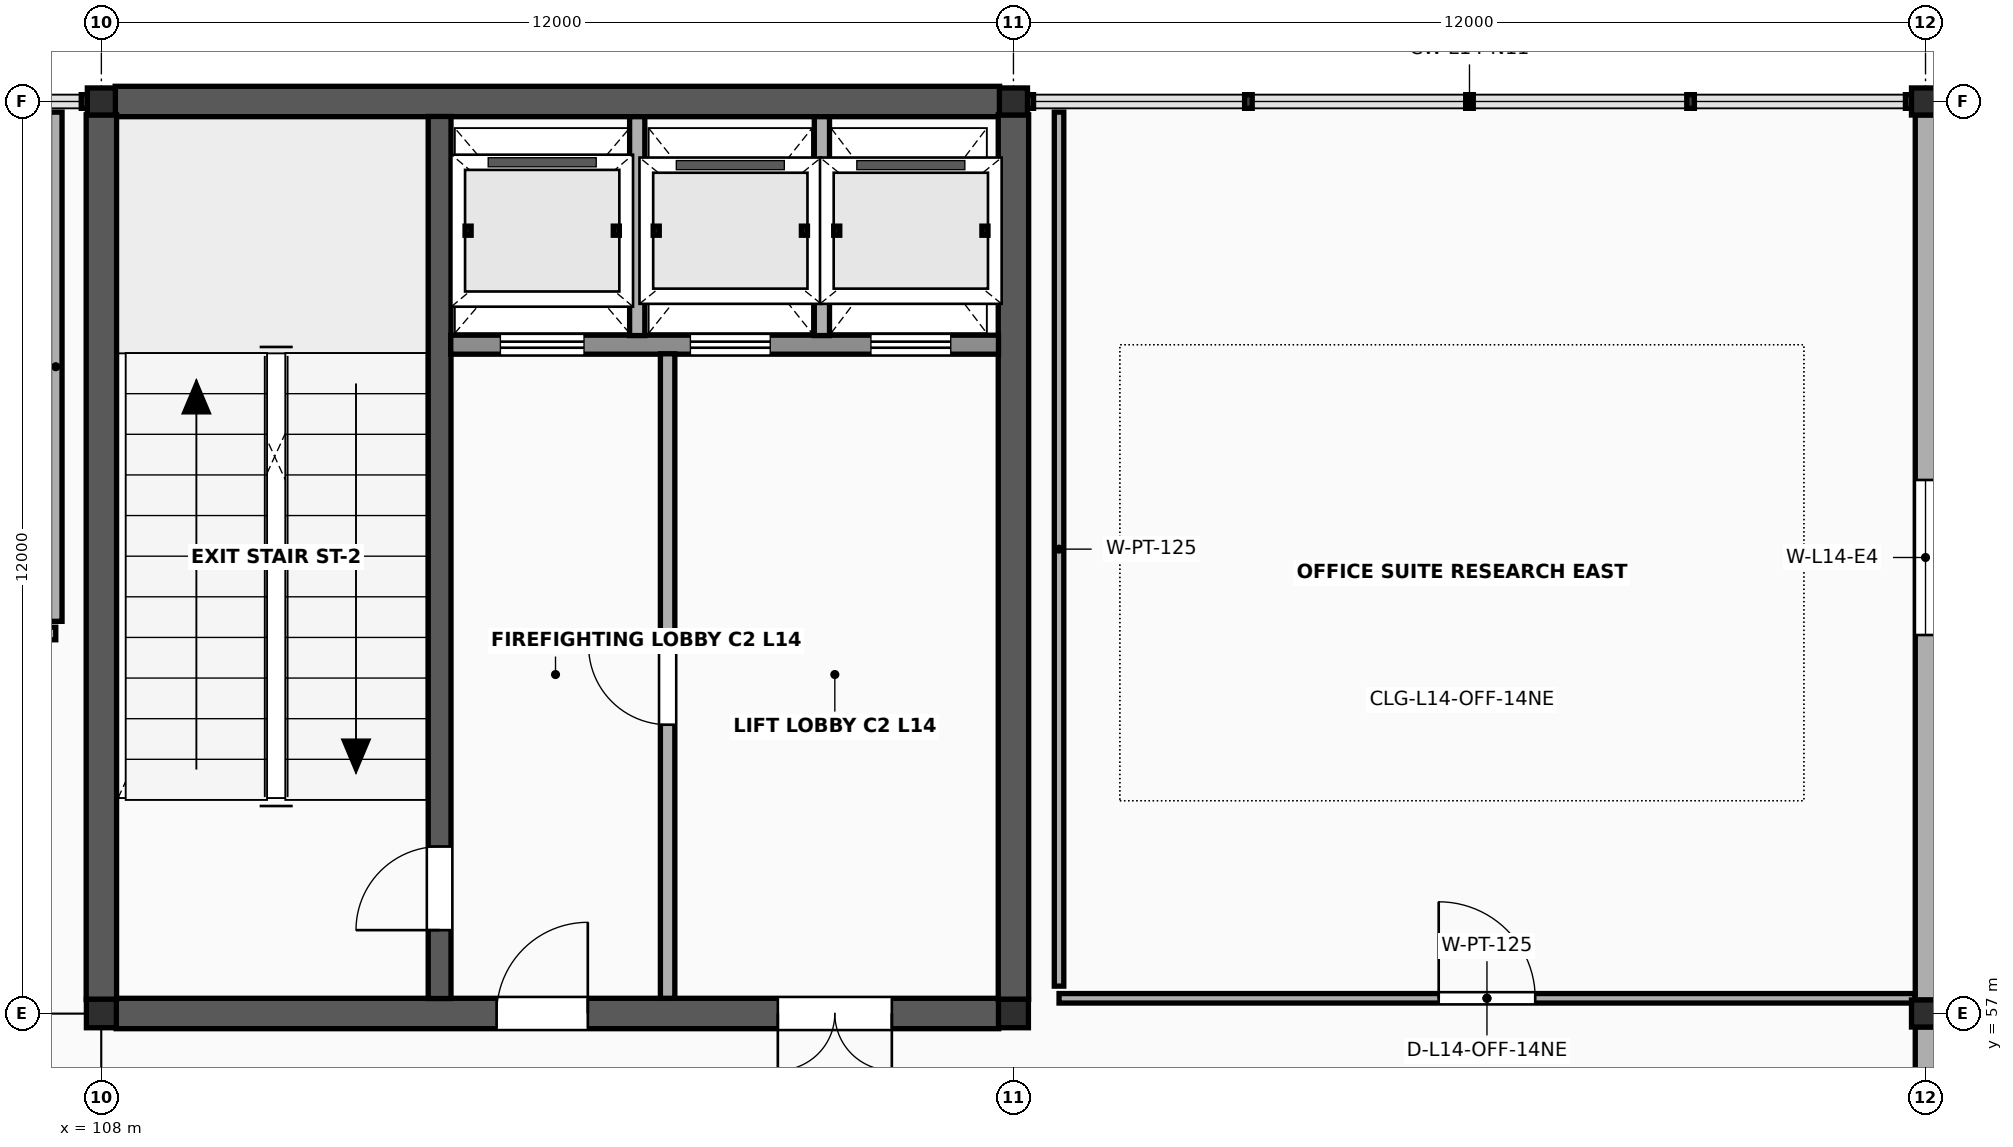
"""IFC4 building model, lengths in metres.
Left out: names, types, materials, properties, quantities, classifications, styles, units other than length and angle.
Written with IfcOpenShell. Run it as: python <this file> out.ifc"""

import sys

from ifc_helpers import new_model, si_unit, direction, frame, frame_2d, origin, origin_2d, place, context, subcontext, project, spatial, rectangle, i_section, extrude, element, fill, save


model = new_model("IFC4")
c1 = context("Model", 3, precision=1e-05, world=origin(), true_north=direction((0.0, 1.0)))
c2 = subcontext(c1, "Body", "Model", "MODEL_VIEW")
j1 = project(units=[si_unit("LENGTHUNIT", "METRE"), si_unit("PLANEANGLEUNIT", "RADIAN")], contexts=[c1])
p1 = place(None, origin())
s1 = spatial("IfcSite", under=j1, at=p1, CompositionType="ELEMENT")
p2 = place(p1, origin())
s2 = spatial("IfcBuilding", under=s1, at=p2, CompositionType="ELEMENT")
p3 = place(p2, frame((0.0, 0.0, 57.6)))
s3 = spatial("IfcBuildingStorey", under=s2, at=p3, CompositionType="ELEMENT", Elevation=57.6)
p4 = place(p3, frame((108.0, 57.0, 0.0), z_axis=(0.0, 0.0, 1.0), x_axis=(1.0, 0.0, 0.0)))
e1 = element("IfcColumn", 1, at=p4, inside=s3, PredefinedType="COLUMN", context=c2, shape_type="SweptSolid", body=[
    extrude(i_section(OverallWidth=0.394, OverallDepth=0.375, WebThickness=0.017, FlangeThickness=0.028, FilletRadius=0.018, at=origin_2d()), origin(), (0.0, 0.0, 1.0), 4.0),
])
p5 = place(p3, frame((108.0, 69.0, 0.0), z_axis=(0.0, 0.0, 1.0), x_axis=(1.0, 0.0, 0.0)))
e2 = element("IfcColumn", 2, at=p5, inside=s3, PredefinedType="COLUMN", context=c2, shape_type="SweptSolid", body=[
    extrude(i_section(OverallWidth=0.369, OverallDepth=0.356, WebThickness=0.011, FlangeThickness=0.018, FilletRadius=0.018, at=origin_2d()), origin(), (0.0, 0.0, 1.0), 4.0),
])
p6 = place(p3, frame((120.0, 57.0, 0.0), z_axis=(0.0, 0.0, 1.0), x_axis=(1.0, 0.0, 0.0)))
e3 = element("IfcColumn", 3, at=p6, inside=s3, PredefinedType="COLUMN", context=c2, shape_type="SweptSolid", body=[
    extrude(i_section(OverallWidth=0.394, OverallDepth=0.375, WebThickness=0.017, FlangeThickness=0.028, FilletRadius=0.018, at=origin_2d()), origin(), (0.0, 0.0, 1.0), 4.0),
])
for number, where, z_axis, x_axis in (
    (4, (120.0, 69.0, 0.0), (0.0, 0.0, 1.0), (1.0, 0.0, 0.0)),
    (5, (132.0, 57.0, 0.0), (0.0, 0.0, 1.0), (1.0, 0.0, 0.0)),
    (6, (132.0, 69.0, 0.0), (0.0, 0.0, 1.0), (1.0, 0.0, 0.0)),
):
    element("IfcColumn", number, at=place(p3, frame(where, z_axis=z_axis, x_axis=x_axis)), inside=s3, PredefinedType="COLUMN", context=c2, shape_type="SweptSolid", body=[
        extrude(i_section(OverallWidth=0.369, OverallDepth=0.356, WebThickness=0.011, FlangeThickness=0.018, FilletRadius=0.018, at=origin_2d()), origin(), (0.0, 0.0, 1.0), 4.0),
    ])
p7 = place(p3, frame((108.194, 57.0, 0.0), z_axis=(0.0, 0.0, 1.0), x_axis=(1.0, 0.0, 0.0)))
e7 = element("IfcWall", 7, at=p7, inside=s3, PredefinedType="SHEAR", context=c2, shape_type="SweptSolid", body=[
    extrude(rectangle(XDim=11.612, YDim=0.4, at=frame_2d((5.806, 0.0))), origin(), (0.0, 0.0, 1.0), 3.853),
])
p8 = place(p7, frame((5.006, 0.0, 0.0)))
e8 = element("IfcOpeningElement", 8, at=p8, cuts=e7, PredefinedType="OPENING", context=c2, shape_type="SweptSolid", body=[
    extrude(rectangle(XDim=1.2, YDim=2.2, at=frame_2d((0.6, 1.1))), frame((0.0, 0.215, 0.0), z_axis=(0.0, -1.0, 0.0), x_axis=(1.0, 0.0, 0.0)), (0.0, 0.0, 1.0), 0.43),
])
p9 = place(p7, frame((8.706, 0.0, 0.0)))
e9 = element("IfcOpeningElement", 9, at=p9, cuts=e7, PredefinedType="OPENING", context=c2, shape_type="SweptSolid", body=[
    extrude(rectangle(XDim=1.5, YDim=2.25, at=frame_2d((0.75, 1.125))), frame((0.0, 0.215, 0.0), z_axis=(0.0, -1.0, 0.0), x_axis=(1.0, 0.0, 0.0)), (0.0, 0.0, 1.0), 0.43),
])
p10 = place(p3, frame((108.181, 69.0, 0.0), z_axis=(0.0, 0.0, 1.0), x_axis=(1.0, 0.0, 0.0)))
e10 = element("IfcWall", 10, at=p10, inside=s3, PredefinedType="SHEAR", context=c2, shape_type="SweptSolid", body=[
    extrude(rectangle(XDim=11.637, YDim=0.4, at=frame_2d((5.819, 0.0))), origin(), (0.0, 0.0, 1.0), 3.853),
])
for number, where, z_axis, x_axis in (
    (11, (108.0, 57.185, 0.0), (0.0, 0.0, 1.0), (0.0, 1.0, 0.0)),
    (12, (120.0, 57.185, 0.0), (0.0, 0.0, 1.0), (0.0, 1.0, 0.0)),
):
    element("IfcWall", number, at=place(p3, frame(where, z_axis=z_axis, x_axis=x_axis)), inside=s3, PredefinedType="SHEAR", context=c2, shape_type="SweptSolid", body=[
        extrude(rectangle(XDim=11.64, YDim=0.4, at=frame_2d((5.82, 0.0))), origin(), (0.0, 0.0, 1.0), 3.853),
    ])
p11 = place(p3, frame((112.45, 57.197, 0.0), z_axis=(0.0, 0.0, 1.0), x_axis=(0.0, 1.0, 0.0)))
e13 = element("IfcWall", 13, at=p11, inside=s3, PredefinedType="SHEAR", context=c2, shape_type="SweptSolid", body=[
    extrude(rectangle(XDim=11.606, YDim=0.3, at=frame_2d((5.803, 0.0))), origin(), (0.0, 0.0, 1.0), 3.853),
])
p12 = place(p11, frame((0.9, 0.0, 0.0)))
e14 = element("IfcOpeningElement", 14, at=p12, cuts=e13, PredefinedType="OPENING", context=c2, shape_type="SweptSolid", body=[
    extrude(rectangle(XDim=1.1, YDim=2.2, at=frame_2d((0.55, 1.1))), frame((0.0, 0.165, 0.0), z_axis=(0.0, -1.0, 0.0), x_axis=(1.0, 0.0, 0.0)), (0.0, 0.0, 1.0), 0.33),
])
p13 = place(p3, frame((112.597, 65.8, 0.0), z_axis=(0.0, 0.0, 1.0), x_axis=(1.0, 0.0, 0.0)))
e15 = element("IfcWall", 15, at=p13, inside=s3, PredefinedType="SOLIDWALL", context=c2, shape_type="SweptSolid", body=[
    extrude(rectangle(XDim=7.206, YDim=0.25, at=frame_2d((3.603, 0.0))), origin(), (0.0, 0.0, 1.0), 3.853),
])
p14 = place(p13, frame((0.653, 0.0, 0.0)))
e16 = element("IfcOpeningElement", 16, at=p14, cuts=e15, PredefinedType="OPENING", context=c2, shape_type="SweptSolid", body=[
    extrude(rectangle(XDim=1.1, YDim=2.24, at=frame_2d((0.55, 1.12))), frame((0.0, 0.14, 0.0), z_axis=(0.0, -1.0, 0.0), x_axis=(1.0, 0.0, 0.0)), (0.0, 0.0, 1.0), 0.28),
])
p15 = place(p13, frame((3.153, 0.0, 0.0)))
e17 = element("IfcOpeningElement", 17, at=p15, cuts=e15, PredefinedType="OPENING", context=c2, shape_type="SweptSolid", body=[
    extrude(rectangle(XDim=1.05, YDim=2.2, at=frame_2d((0.525, 1.1))), frame((0.0, 0.14, 0.0), z_axis=(0.0, -1.0, 0.0), x_axis=(1.0, 0.0, 0.0)), (0.0, 0.0, 1.0), 0.28),
])
p16 = place(p13, frame((5.528, 0.0, 0.0)))
e18 = element("IfcOpeningElement", 18, at=p16, cuts=e15, PredefinedType="OPENING", context=c2, shape_type="SweptSolid", body=[
    extrude(rectangle(XDim=1.05, YDim=2.2, at=frame_2d((0.525, 1.1))), frame((0.0, 0.14, 0.0), z_axis=(0.0, -1.0, 0.0), x_axis=(1.0, 0.0, 0.0)), (0.0, 0.0, 1.0), 0.28),
])
for number, where, z_axis, x_axis in (
    (19, (115.05, 65.92, 0.0), (0.0, 0.0, 1.0), (0.0, 1.0, 0.0)),
    (20, (117.48, 65.92, 0.0), (0.0, 0.0, 1.0), (0.0, 1.0, 0.0)),
):
    element("IfcWall", number, at=place(p3, frame(where, z_axis=z_axis, x_axis=x_axis)), inside=s3, PredefinedType="SOLIDWALL", context=c2, shape_type="SweptSolid", body=[
        extrude(rectangle(XDim=2.88, YDim=0.2, at=frame_2d((1.44, 0.0))), origin(), (0.0, 0.0, 1.0), 3.843),
    ])
p17 = place(p3, frame((115.45, 57.2, 0.0), z_axis=(0.0, 0.0, 1.0), x_axis=(0.0, 1.0, 0.0)))
e21 = element("IfcWall", 21, at=p17, inside=s3, PredefinedType="SOLIDWALL", context=c2, shape_type="SweptSolid", body=[
    extrude(rectangle(XDim=8.48, YDim=0.19, at=frame_2d((4.24, 0.0))), origin(), (0.0, 0.0, 1.0), 3.843),
])
p18 = place(p17, frame((3.6, 0.0, 0.0)))
e22 = element("IfcOpeningElement", 22, at=p18, cuts=e21, PredefinedType="OPENING", context=c2, shape_type="SweptSolid", body=[
    extrude(rectangle(XDim=1.04, YDim=2.18, at=frame_2d((0.52, 1.09))), frame((0.0, 0.11, 0.0), z_axis=(0.0, -1.0, 0.0), x_axis=(1.0, 0.0, 0.0)), (0.0, 0.0, 1.0), 0.22),
])
p19 = place(p3, frame((132.0, 45.176, 0.0), z_axis=(0.0, 0.0, 1.0), x_axis=(0.0, 1.0, 0.0)))
e23 = element("IfcWall", 23, at=p19, inside=s3, PredefinedType="SOLIDWALL", context=c2, shape_type="SweptSolid", body=[
    extrude(rectangle(XDim=11.648, YDim=0.27, at=frame_2d((5.824, 0.0))), origin(), (0.0, 0.0, 1.0), 3.216),
])
p20 = place(p19, frame((4.894, 0.0, 0.78)))
e24 = element("IfcOpeningElement", 24, at=p20, cuts=e23, PredefinedType="OPENING", context=c2, shape_type="SweptSolid", body=[
    extrude(rectangle(XDim=1.86, YDim=1.74, at=frame_2d((0.93, 0.87))), frame((0.0, 0.15, 0.0), z_axis=(0.0, -1.0, 0.0), x_axis=(1.0, 0.0, 0.0)), (0.0, 0.0, 1.0), 0.3),
])
p21 = place(p3, frame((132.0, 57.176, 0.0), z_axis=(0.0, 0.0, 1.0), x_axis=(0.0, 1.0, 0.0)))
e25 = element("IfcWall", 25, at=p21, inside=s3, PredefinedType="SOLIDWALL", context=c2, shape_type="SweptSolid", body=[
    extrude(rectangle(XDim=11.648, YDim=0.27, at=frame_2d((5.824, 0.0))), origin(), (0.0, 0.0, 1.0), 3.216),
])
p22 = place(p21, frame((4.804, 0.0, 0.78)))
e26 = element("IfcOpeningElement", 26, at=p22, cuts=e25, PredefinedType="OPENING", context=c2, shape_type="SweptSolid", body=[
    extrude(rectangle(XDim=2.04, YDim=1.74, at=frame_2d((1.02, 0.87))), frame((0.0, 0.15, 0.0), z_axis=(0.0, -1.0, 0.0), x_axis=(1.0, 0.0, 0.0)), (0.0, 0.0, 1.0), 0.3),
])
p23 = place(p3, frame((73.0, 62.0, 0.0), z_axis=(0.0, 0.0, 1.0), x_axis=(1.0, 0.0, 0.0)))
e27 = element("IfcWall", 27, at=p23, inside=s3, PredefinedType="PARTITIONING", context=c2, shape_type="SweptSolid", body=[
    extrude(rectangle(XDim=34.4, YDim=0.165, at=frame_2d((17.2, 0.0))), origin(), (0.0, 0.0, 1.0), 2.88),
])
p24 = place(p23, frame((16.13, 0.0, 0.0)))
e28 = element("IfcOpeningElement", 28, at=p24, cuts=e27, PredefinedType="OPENING", context=c2, shape_type="SweptSolid", body=[
    extrude(rectangle(XDim=2.14, YDim=2.44, at=frame_2d((1.07, 1.22))), frame((0.0, 0.097, 0.0), z_axis=(0.0, -1.0, 0.0), x_axis=(1.0, 0.0, 0.0)), (0.0, 0.0, 1.0), 0.195),
])
p25 = place(p3, frame((107.4, 62.16, 0.0), z_axis=(0.0, 0.0, 1.0), x_axis=(0.0, 1.0, 0.0)))
e29 = element("IfcWall", 29, at=p25, inside=s3, PredefinedType="PARTITIONING", context=c2, shape_type="SweptSolid", body=[
    extrude(rectangle(XDim=6.7, YDim=0.165, at=frame_2d((3.35, 0.0))), origin(), (0.0, 0.0, 1.0), 2.88),
])
p26 = place(p3, frame((120.6, 57.2, 0.0), z_axis=(0.0, 0.0, 1.0), x_axis=(1.0, 0.0, 0.0)))
e30 = element("IfcWall", 30, at=p26, inside=s3, PredefinedType="PARTITIONING", context=c2, shape_type="SweptSolid", body=[
    extrude(rectangle(XDim=11.26, YDim=0.125, at=frame_2d((5.63, 0.0))), origin(), (0.0, 0.0, 1.0), 2.88),
])
p27 = place(p26, frame((4.995, 0.0, 0.0)))
e31 = element("IfcOpeningElement", 31, at=p27, cuts=e30, PredefinedType="OPENING", context=c2, shape_type="SweptSolid", body=[
    extrude(rectangle(XDim=1.27, YDim=2.27, at=frame_2d((0.635, 1.135))), frame((0.0, 0.077, 0.0), z_axis=(0.0, -1.0, 0.0), x_axis=(1.0, 0.0, 0.0)), (0.0, 0.0, 1.0), 0.155),
])
p28 = place(p3, frame((120.6, 57.36, 0.0), z_axis=(0.0, 0.0, 1.0), x_axis=(0.0, 1.0, 0.0)))
e32 = element("IfcWall", 32, at=p28, inside=s3, PredefinedType="PARTITIONING", context=c2, shape_type="SweptSolid", body=[
    extrude(rectangle(XDim=11.5, YDim=0.125, at=frame_2d((5.75, 0.0))), origin(), (0.0, 0.0, 1.0), 2.88),
])
p29 = place(p22, origin())
e33 = element("IfcWindow", 33, at=p29, inside=s3, PartitioningType="DOUBLE_PANEL_VERTICAL", PredefinedType="WINDOW", context=c2, shape_type="SweptSolid", body=[
    extrude(rectangle(XDim=2.04, YDim=1.74, at=frame_2d((1.02, 0.87))), frame((0.0, 0.03, 0.0), z_axis=(0.0, -1.0, 0.0), x_axis=(1.0, 0.0, 0.0)), (0.0, 0.0, 1.0), 0.06),
])
fill(e26, e33)
p30 = place(p12, origin())
e34 = element("IfcDoor", 34, at=p30, inside=s3, OperationType="SINGLE_SWING_LEFT", PredefinedType="DOOR", context=c2, shape_type="SweptSolid", body=[
    extrude(rectangle(XDim=1.1, YDim=2.2, at=frame_2d((0.55, 1.1))), frame((0.0, 0.025, 0.0), z_axis=(0.0, -1.0, 0.0), x_axis=(1.0, 0.0, 0.0)), (0.0, 0.0, 1.0), 0.05),
])
fill(e14, e34)
p31 = place(p18, origin())
e35 = element("IfcDoor", 35, at=p31, inside=s3, OperationType="SINGLE_SWING_RIGHT", PredefinedType="DOOR", context=c2, shape_type="SweptSolid", body=[
    extrude(rectangle(XDim=1.04, YDim=2.18, at=frame_2d((0.52, 1.09))), frame((0.0, 0.025, 0.0), z_axis=(0.0, -1.0, 0.0), x_axis=(1.0, 0.0, 0.0)), (0.0, 0.0, 1.0), 0.05),
])
fill(e22, e35)
p32 = place(p8, origin())
e36 = element("IfcDoor", 36, at=p32, inside=s3, OperationType="SINGLE_SWING_RIGHT", PredefinedType="DOOR", context=c2, shape_type="SweptSolid", body=[
    extrude(rectangle(XDim=1.2, YDim=2.2, at=frame_2d((0.6, 1.1))), frame((0.0, 0.025, 0.0), z_axis=(0.0, -1.0, 0.0), x_axis=(1.0, 0.0, 0.0)), (0.0, 0.0, 1.0), 0.05),
])
fill(e8, e36)
p33 = place(p9, origin())
e37 = element("IfcDoor", 37, at=p33, inside=s3, OperationType="DOUBLE_DOOR_SINGLE_SWING", PredefinedType="DOOR", context=c2, shape_type="SweptSolid", body=[
    extrude(rectangle(XDim=1.5, YDim=2.25, at=frame_2d((0.75, 1.125))), frame((0.0, 0.025, 0.0), z_axis=(0.0, -1.0, 0.0), x_axis=(1.0, 0.0, 0.0)), (0.0, 0.0, 1.0), 0.05),
])
fill(e9, e37)
p34 = place(p14, origin())
e38 = element("IfcDoor", 38, at=p34, inside=s3, OperationType="SLIDING_TO_LEFT", PredefinedType="USERDEFINED", context=c2, shape_type="SweptSolid", body=[
    extrude(rectangle(XDim=1.1, YDim=2.24, at=frame_2d((0.55, 1.12))), frame((0.0, 0.025, 0.0), z_axis=(0.0, -1.0, 0.0), x_axis=(1.0, 0.0, 0.0)), (0.0, 0.0, 1.0), 0.05),
])
fill(e16, e38)
p35 = place(p15, origin())
e39 = element("IfcDoor", 39, at=p35, inside=s3, OperationType="SLIDING_TO_LEFT", PredefinedType="USERDEFINED", context=c2, shape_type="SweptSolid", body=[
    extrude(rectangle(XDim=1.05, YDim=2.2, at=frame_2d((0.525, 1.1))), frame((0.0, 0.025, 0.0), z_axis=(0.0, -1.0, 0.0), x_axis=(1.0, 0.0, 0.0)), (0.0, 0.0, 1.0), 0.05),
])
fill(e17, e39)
p36 = place(p16, origin())
e40 = element("IfcDoor", 40, at=p36, inside=s3, OperationType="SLIDING_TO_LEFT", PredefinedType="USERDEFINED", context=c2, shape_type="SweptSolid", body=[
    extrude(rectangle(XDim=1.05, YDim=2.2, at=frame_2d((0.525, 1.1))), frame((0.0, 0.025, 0.0), z_axis=(0.0, -1.0, 0.0), x_axis=(1.0, 0.0, 0.0)), (0.0, 0.0, 1.0), 0.05),
])
fill(e18, e40)
p37 = place(p27, origin())
e41 = element("IfcDoor", 41, at=p37, inside=s3, OperationType="SINGLE_SWING_LEFT", PredefinedType="DOOR", context=c2, shape_type="SweptSolid", body=[
    extrude(rectangle(XDim=1.27, YDim=2.27, at=frame_2d((0.635, 1.135))), frame((0.0, 0.025, 0.0), z_axis=(0.0, -1.0, 0.0), x_axis=(1.0, 0.0, 0.0)), (0.0, 0.0, 1.0), 0.05),
])
fill(e31, e41)
save(model, sys.argv[1])
